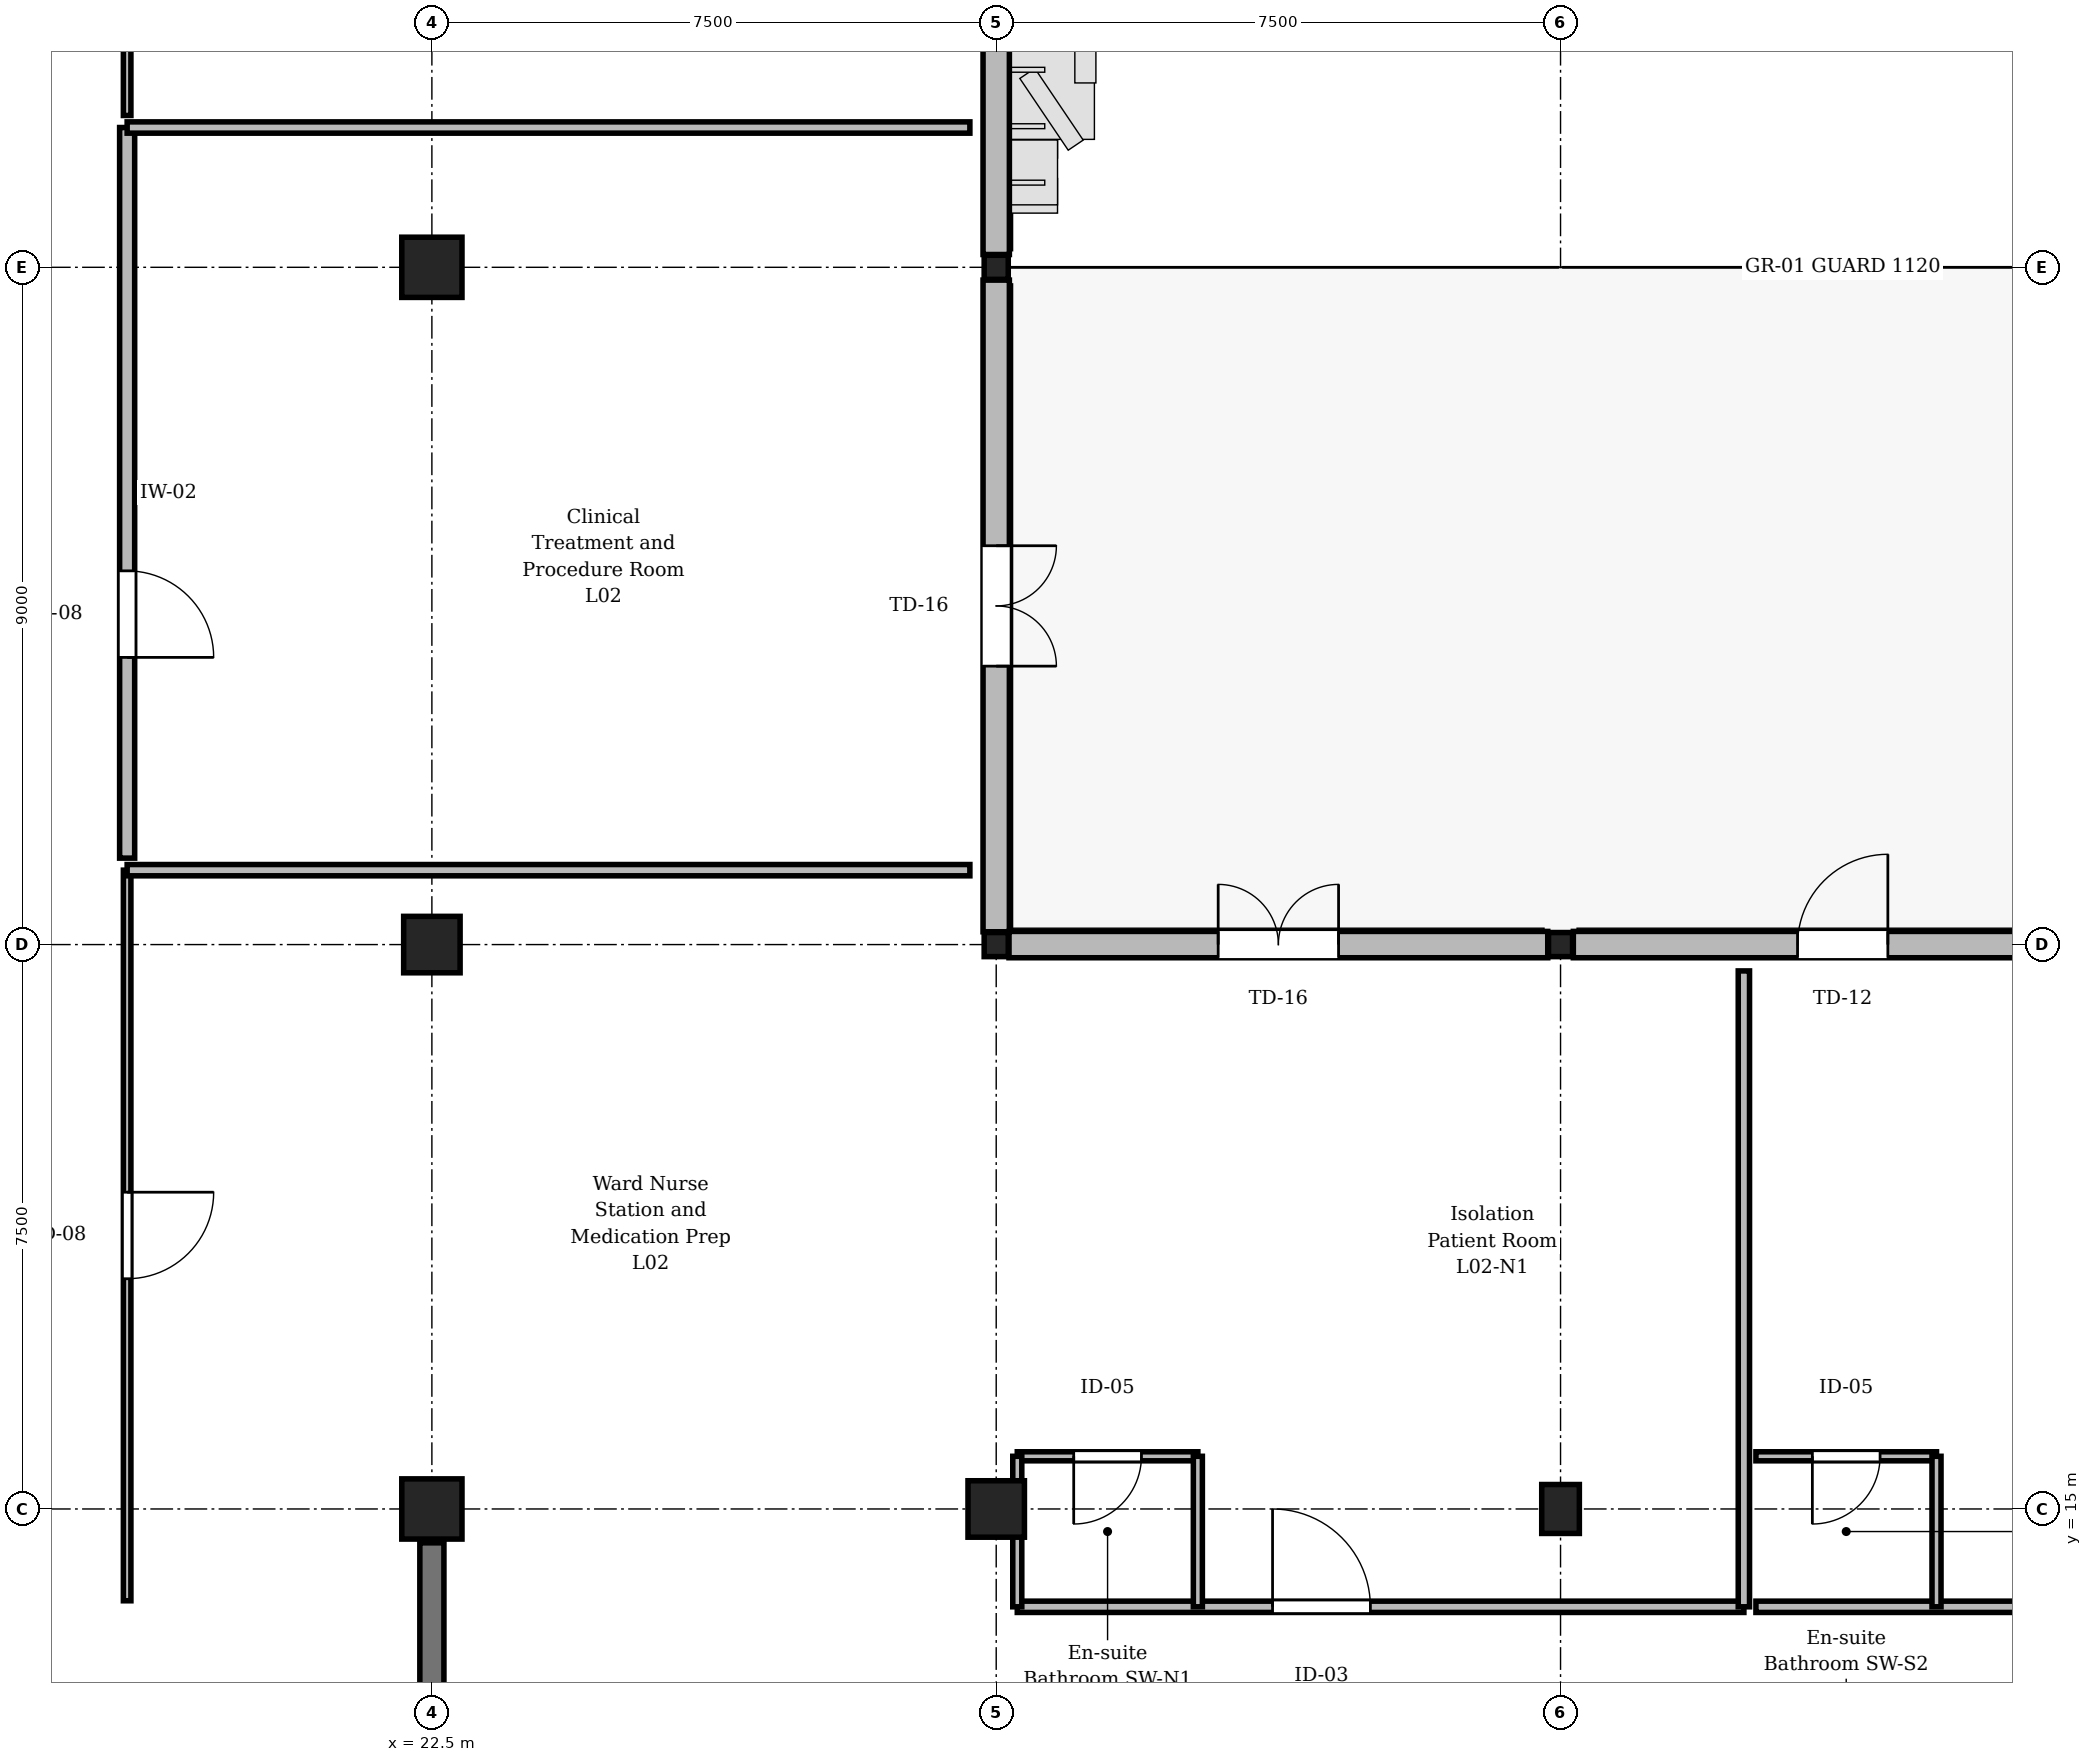
"""IFC4 building model, lengths in metres.
Left out: names, types, materials, properties, quantities, classifications, styles, units other than length and angle.
Written with IfcOpenShell. Run it as: python <this file> out.ifc"""

import sys

from ifc_helpers import new_model, si_unit, direction, frame, frame_2d, origin, origin_2d, place, context, subcontext, project, spatial, rectangle, circle, extrude, element, fill, save


model = new_model("IFC4")
c1 = context("Model", 3, precision=1e-05, world=origin(), true_north=direction((0.0, 1.0)))
c2 = subcontext(c1, "Body", "Model", "MODEL_VIEW")
j1 = project(units=[si_unit("LENGTHUNIT", "METRE"), si_unit("PLANEANGLEUNIT", "RADIAN")], contexts=[c1])
p1 = place(None, origin())
s1 = spatial("IfcSite", under=j1, at=p1, CompositionType="ELEMENT")
p2 = place(p1, origin())
s2 = spatial("IfcBuilding", under=s1, at=p2, CompositionType="ELEMENT")
p3 = place(p2, frame((0.0, 0.0, 9.3)))
s3 = spatial("IfcBuildingStorey", under=s2, at=p3, CompositionType="ELEMENT", Elevation=9.3)
p4 = place(p3, frame((22.5, 15.0, 0.0), z_axis=(0.0, 0.0, 1.0), x_axis=(1.0, 0.0, 0.0)))
e1 = element("IfcColumn", 1, at=p4, inside=s3, PredefinedType="COLUMN", context=c2, shape_type="SweptSolid", body=[
    extrude(rectangle(XDim=0.8, YDim=0.8, at=origin_2d()), origin(), (0.0, 0.0, 1.0), 4.8),
])
p5 = place(p3, frame((22.5, 22.5, 0.0), z_axis=(0.0, 0.0, 1.0), x_axis=(1.0, 0.0, 0.0)))
e2 = element("IfcColumn", 2, at=p5, inside=s3, PredefinedType="COLUMN", context=c2, shape_type="SweptSolid", body=[
    extrude(circle(Radius=0.375, at=origin_2d()), origin(), (0.0, 0.0, 1.0), 4.8),
])
p6 = place(p3, frame((22.5, 31.5, 0.0), z_axis=(0.0, 0.0, 1.0), x_axis=(1.0, 0.0, 0.0)))
e3 = element("IfcColumn", 3, at=p6, inside=s3, PredefinedType="COLUMN", context=c2, shape_type="SweptSolid", body=[
    extrude(rectangle(XDim=0.8, YDim=0.8, at=origin_2d()), origin(), (0.0, 0.0, 1.0), 4.8),
])
p7 = place(p3, frame((30.0, 15.0, 0.0), z_axis=(0.0, 0.0, 1.0), x_axis=(1.0, 0.0, 0.0)))
e4 = element("IfcColumn", 4, at=p7, inside=s3, PredefinedType="COLUMN", context=c2, shape_type="SweptSolid", body=[
    extrude(circle(Radius=0.375, at=origin_2d()), origin(), (0.0, 0.0, 1.0), 4.8),
])
for number, where, z_axis, x_axis in (
    (5, (30.0, 22.5, 0.0), (0.0, 0.0, 1.0), (1.0, 0.0, 0.0)),
    (6, (30.0, 31.5, 0.0), (0.0, 0.0, 1.0), (1.0, 0.0, 0.0)),
):
    element("IfcColumn", number, at=place(p3, frame(where, z_axis=z_axis, x_axis=x_axis)), inside=s3, PredefinedType="COLUMN", context=c2, shape_type="SweptSolid", body=[
        extrude(rectangle(XDim=0.32, YDim=0.32, at=origin_2d()), origin(), (0.0, 0.0, 1.0), 4.8),
    ])
p8 = place(p3, frame((37.5, 15.0, 0.0), z_axis=(0.0, 0.0, 1.0), x_axis=(1.0, 0.0, 0.0)))
e7 = element("IfcColumn", 7, at=p8, inside=s3, PredefinedType="COLUMN", context=c2, shape_type="SweptSolid", body=[
    extrude(rectangle(XDim=0.5, YDim=0.65, at=origin_2d()), origin(), (0.0, 0.0, 1.0), 4.8),
])
p9 = place(p3, frame((37.5, 22.5, 0.0), z_axis=(0.0, 0.0, 1.0), x_axis=(1.0, 0.0, 0.0)))
e8 = element("IfcColumn", 8, at=p9, inside=s3, PredefinedType="COLUMN", context=c2, shape_type="SweptSolid", body=[
    extrude(rectangle(XDim=0.32, YDim=0.32, at=origin_2d()), origin(), (0.0, 0.0, 1.0), 4.8),
])
p10 = place(p3, frame((22.5, 7.95, 0.0), z_axis=(0.0, 0.0, 1.0), x_axis=(0.0, 1.0, 0.0)))
e9 = element("IfcWall", 9, at=p10, inside=s3, PredefinedType="SHEAR", context=c2, shape_type="SweptSolid", body=[
    extrude(rectangle(XDim=6.6, YDim=0.32, at=frame_2d((3.3, 0.0))), origin(), (0.0, 0.0, 1.0), 4.0),
])
p11 = place(p3, frame((30.0, 31.33, 0.0), z_axis=(0.0, 0.0, 1.0), x_axis=(0.0, -1.0, 0.0)))
e10 = element("IfcWall", 10, at=p11, inside=s3, PredefinedType="STANDARD", context=c2, shape_type="SweptSolid", body=[
    extrude(rectangle(XDim=8.66, YDim=0.35, at=frame_2d((4.33, 0.0))), origin(), (0.0, 0.0, 1.0), 4.0),
])
p12 = place(p11, frame((3.53, 0.0, 0.0)))
e11 = element("IfcOpeningElement", 11, at=p12, cuts=e10, PredefinedType="OPENING", context=c2, shape_type="SweptSolid", body=[
    extrude(rectangle(XDim=1.6, YDim=2.35, at=frame_2d((0.8, 1.175))), frame((0.0, 0.185, 0.0), z_axis=(0.0, -1.0, 0.0), x_axis=(1.0, 0.0, 0.0)), (0.0, 0.0, 1.0), 0.37),
])
p13 = place(p3, frame((30.0, 38.83, 0.0), z_axis=(0.0, 0.0, 1.0), x_axis=(0.0, -1.0, 0.0)))
e12 = element("IfcWall", 12, at=p13, inside=s3, PredefinedType="STANDARD", context=c2, shape_type="SweptSolid", body=[
    extrude(rectangle(XDim=7.16, YDim=0.35, at=frame_2d((3.58, 0.0))), origin(), (0.0, 0.0, 1.0), 3.95),
])
p14 = place(p13, frame((2.78, 0.0, 0.9)))
e13 = element("IfcOpeningElement", 13, at=p14, cuts=e12, PredefinedType="OPENING", context=c2, shape_type="SweptSolid", body=[
    extrude(rectangle(XDim=1.6, YDim=1.8, at=frame_2d((0.8, 0.9))), frame((0.0, 0.185, 0.0), z_axis=(0.0, -1.0, 0.0), x_axis=(1.0, 0.0, 0.0)), (0.0, 0.0, 1.0), 0.37),
])
p15 = place(p3, frame((30.17, 22.5, 0.0), z_axis=(0.0, 0.0, 1.0), x_axis=(1.0, 0.0, 0.0)))
e14 = element("IfcWall", 14, at=p15, inside=s3, PredefinedType="STANDARD", context=c2, shape_type="SweptSolid", body=[
    extrude(rectangle(XDim=7.16, YDim=0.35, at=frame_2d((3.58, 0.0))), origin(), (0.0, 0.0, 1.0), 3.95),
])
p16 = place(p15, frame((2.78, 0.0, 0.0)))
e15 = element("IfcOpeningElement", 15, at=p16, cuts=e14, PredefinedType="OPENING", context=c2, shape_type="SweptSolid", body=[
    extrude(rectangle(XDim=1.6, YDim=2.35, at=frame_2d((0.8, 1.175))), frame((0.0, 0.185, 0.0), z_axis=(0.0, -1.0, 0.0), x_axis=(1.0, 0.0, 0.0)), (0.0, 0.0, 1.0), 0.37),
])
p17 = place(p3, frame((37.67, 22.5, 0.0), z_axis=(0.0, 0.0, 1.0), x_axis=(1.0, 0.0, 0.0)))
e16 = element("IfcWall", 16, at=p17, inside=s3, PredefinedType="STANDARD", context=c2, shape_type="SweptSolid", body=[
    extrude(rectangle(XDim=7.16, YDim=0.35, at=frame_2d((3.58, 0.0))), origin(), (0.0, 0.0, 1.0), 3.95),
])
p18 = place(p17, frame((2.98, 0.0, 0.0)))
e17 = element("IfcOpeningElement", 17, at=p18, cuts=e16, PredefinedType="OPENING", context=c2, shape_type="SweptSolid", body=[
    extrude(rectangle(XDim=1.2, YDim=2.3, at=frame_2d((0.6, 1.15))), frame((0.0, 0.185, 0.0), z_axis=(0.0, -1.0, 0.0), x_axis=(1.0, 0.0, 0.0)), (0.0, 0.0, 1.0), 0.37),
])
p19 = place(p3, frame((18.45, 23.489, 0.0), z_axis=(0.0, 0.0, 1.0), x_axis=(0.0, -1.0, 0.0)))
e18 = element("IfcWall", 18, at=p19, inside=s3, PredefinedType="PARTITIONING", context=c2, shape_type="SweptSolid", body=[
    extrude(rectangle(XDim=9.709, YDim=0.1, at=frame_2d((4.854, 0.0))), origin(), (0.0, 0.0, 1.0), 4.135),
])
p20 = place(p19, frame((4.279, 0.0, 0.0)))
e19 = element("IfcOpeningElement", 19, at=p20, cuts=e18, PredefinedType="OPENING", context=c2, shape_type="SweptSolid", body=[
    extrude(rectangle(XDim=1.15, YDim=2.2, at=frame_2d((0.575, 1.1))), frame((0.0, 0.06, 0.0), z_axis=(0.0, -1.0, 0.0), x_axis=(1.0, 0.0, 0.0)), (0.0, 0.0, 1.0), 0.12),
])
p21 = place(p3, frame((18.45, 33.357, 0.0), z_axis=(0.0, 0.0, 1.0), x_axis=(0.0, -1.0, 0.0)))
e20 = element("IfcWall", 20, at=p21, inside=s3, PredefinedType="STANDARD", context=c2, shape_type="SweptSolid", body=[
    extrude(rectangle(XDim=9.709, YDim=0.2, at=frame_2d((4.854, 0.0))), origin(), (0.0, 0.0, 1.0), 4.135),
])
p22 = place(p21, frame((5.891, 0.0, 0.0)))
e21 = element("IfcOpeningElement", 21, at=p22, cuts=e20, PredefinedType="OPENING", context=c2, shape_type="SweptSolid", body=[
    extrude(rectangle(XDim=1.15, YDim=2.2, at=frame_2d((0.575, 1.1))), frame((0.0, 0.11, 0.0), z_axis=(0.0, -1.0, 0.0), x_axis=(1.0, 0.0, 0.0)), (0.0, 0.0, 1.0), 0.22),
])
p23 = place(p3, frame((18.45, 43.226, 0.0), z_axis=(0.0, 0.0, 1.0), x_axis=(0.0, -1.0, 0.0)))
e22 = element("IfcWall", 22, at=p23, inside=s3, PredefinedType="PARTITIONING", context=c2, shape_type="SweptSolid", body=[
    extrude(rectangle(XDim=9.709, YDim=0.1, at=frame_2d((4.854, 0.0))), origin(), (0.0, 0.0, 1.0), 4.535),
])
p24 = place(p23, frame((7.593, 0.0, 0.0)))
e23 = element("IfcOpeningElement", 23, at=p24, cuts=e22, PredefinedType="OPENING", context=c2, shape_type="SweptSolid", body=[
    extrude(rectangle(XDim=1.05, YDim=2.2, at=frame_2d((0.525, 1.1))), frame((0.0, 0.06, 0.0), z_axis=(0.0, -1.0, 0.0), x_axis=(1.0, 0.0, 0.0)), (0.0, 0.0, 1.0), 0.12),
])
p25 = place(p3, frame((30.28, 13.7, 0.0), z_axis=(0.0, 0.0, 1.0), x_axis=(1.0, 0.0, 0.0)))
e24 = element("IfcWall", 24, at=p25, inside=s3, PredefinedType="PARTITIONING", context=c2, shape_type="SweptSolid", body=[
    extrude(rectangle(XDim=9.657, YDim=0.15, at=frame_2d((4.828, 0.0))), origin(), (0.0, 0.0, 1.0), 4.535),
])
p26 = place(p25, frame((3.393, 0.0, 0.0)))
e25 = element("IfcOpeningElement", 25, at=p26, cuts=e24, PredefinedType="OPENING", context=c2, shape_type="SweptSolid", body=[
    extrude(rectangle(XDim=1.3, YDim=2.2, at=frame_2d((0.65, 1.1))), frame((0.0, 0.085, 0.0), z_axis=(0.0, -1.0, 0.0), x_axis=(1.0, 0.0, 0.0)), (0.0, 0.0, 1.0), 0.17),
])
p27 = place(p3, frame((32.68, 15.7, 0.0), z_axis=(0.0, 0.0, 1.0), x_axis=(-1.0, 0.0, 0.0)))
e26 = element("IfcWall", 26, at=p27, inside=s3, PredefinedType="PARTITIONING", context=c2, shape_type="SweptSolid", body=[
    extrude(rectangle(XDim=2.4, YDim=0.12, at=frame_2d((1.2, 0.0))), origin(), (0.0, 0.0, 1.0), 4.535),
])
p28 = place(p27, frame((0.75, 0.0, 0.0)))
e27 = element("IfcOpeningElement", 27, at=p28, cuts=e26, PredefinedType="OPENING", context=c2, shape_type="SweptSolid", body=[
    extrude(rectangle(XDim=0.9, YDim=2.1, at=frame_2d((0.45, 1.05))), frame((0.0, 0.07, 0.0), z_axis=(0.0, -1.0, 0.0), x_axis=(1.0, 0.0, 0.0)), (0.0, 0.0, 1.0), 0.14),
])
p29 = place(p3, frame((32.68, 13.7, 0.0), z_axis=(0.0, 0.0, 1.0), x_axis=(0.0, 1.0, 0.0)))
e28 = element("IfcWall", 28, at=p29, inside=s3, PredefinedType="PARTITIONING", context=c2, shape_type="SweptSolid", body=[
    extrude(rectangle(XDim=2.0, YDim=0.12, at=frame_2d((1.0, 0.0))), origin(), (0.0, 0.0, 1.0), 4.535),
])
p30 = place(p3, frame((40.097, 13.7, 0.0), z_axis=(0.0, 0.0, 1.0), x_axis=(1.0, 0.0, 0.0)))
e29 = element("IfcWall", 29, at=p30, inside=s3, PredefinedType="PARTITIONING", context=c2, shape_type="SweptSolid", body=[
    extrude(rectangle(XDim=9.657, YDim=0.15, at=frame_2d((4.828, 0.0))), origin(), (0.0, 0.0, 1.0), 4.535),
])
p31 = place(p30, frame((8.107, 0.0, 0.0)))
e30 = element("IfcOpeningElement", 30, at=p31, cuts=e29, PredefinedType="OPENING", context=c2, shape_type="SweptSolid", body=[
    extrude(rectangle(XDim=1.3, YDim=2.2, at=frame_2d((0.65, 1.1))), frame((0.0, 0.085, 0.0), z_axis=(0.0, -1.0, 0.0), x_axis=(1.0, 0.0, 0.0)), (0.0, 0.0, 1.0), 0.17),
])
p32 = place(p3, frame((42.497, 15.7, 0.0), z_axis=(0.0, 0.0, 1.0), x_axis=(-1.0, 0.0, 0.0)))
e31 = element("IfcWall", 31, at=p32, inside=s3, PredefinedType="PARTITIONING", context=c2, shape_type="SweptSolid", body=[
    extrude(rectangle(XDim=2.4, YDim=0.12, at=frame_2d((1.2, 0.0))), origin(), (0.0, 0.0, 1.0), 4.535),
])
p33 = place(p32, frame((0.75, 0.0, 0.0)))
e32 = element("IfcOpeningElement", 32, at=p33, cuts=e31, PredefinedType="OPENING", context=c2, shape_type="SweptSolid", body=[
    extrude(rectangle(XDim=0.9, YDim=2.1, at=frame_2d((0.45, 1.05))), frame((0.0, 0.07, 0.0), z_axis=(0.0, -1.0, 0.0), x_axis=(1.0, 0.0, 0.0)), (0.0, 0.0, 1.0), 0.14),
])
p34 = place(p3, frame((42.497, 13.7, 0.0), z_axis=(0.0, 0.0, 1.0), x_axis=(0.0, 1.0, 0.0)))
e33 = element("IfcWall", 33, at=p34, inside=s3, PredefinedType="PARTITIONING", context=c2, shape_type="SweptSolid", body=[
    extrude(rectangle(XDim=2.0, YDim=0.12, at=frame_2d((1.0, 0.0))), origin(), (0.0, 0.0, 1.0), 4.535),
])
for number, where, z_axis, x_axis in (
    (34, (18.45, 23.489, 0.0), (0.0, 0.0, 1.0), (1.0, 0.0, 0.0)),
    (35, (18.45, 33.357, 0.0), (0.0, 0.0, 1.0), (1.0, 0.0, 0.0)),
):
    element("IfcWall", number, at=place(p3, frame(where, z_axis=z_axis, x_axis=x_axis)), inside=s3, PredefinedType="PARTITIONING", context=c2, shape_type="SweptSolid", body=[
        extrude(rectangle(XDim=11.2, YDim=0.15, at=frame_2d((5.6, 0.0))), origin(), (0.0, 0.0, 1.0), 4.535),
    ])
p35 = place(p3, frame((39.937, 13.7, 0.0), z_axis=(0.0, 0.0, 1.0), x_axis=(0.0, 1.0, 0.0)))
e36 = element("IfcWall", 36, at=p35, inside=s3, PredefinedType="PARTITIONING", context=c2, shape_type="SweptSolid", body=[
    extrude(rectangle(XDim=8.45, YDim=0.15, at=frame_2d((4.225, 0.0))), origin(), (0.0, 0.0, 1.0), 4.535),
])
p36 = place(p3, frame((30.28, 13.7, 0.0), z_axis=(0.0, 0.0, 1.0), x_axis=(0.0, 1.0, 0.0)))
e37 = element("IfcWall", 37, at=p36, inside=s3, PredefinedType="PARTITIONING", context=c2, shape_type="SweptSolid", body=[
    extrude(rectangle(XDim=2.0, YDim=0.12, at=frame_2d((1.0, 0.0))), origin(), (0.0, 0.0, 1.0), 3.985),
])
p37 = place(p12, origin())
e38 = element("IfcDoor", 38, at=p37, inside=s3, OperationType="DOUBLE_DOOR_SINGLE_SWING", PredefinedType="DOOR", context=c2, shape_type="SweptSolid", body=[
    extrude(rectangle(XDim=1.6, YDim=2.35, at=frame_2d((0.8, 1.175))), frame((0.0, 0.025, 0.0), z_axis=(0.0, -1.0, 0.0), x_axis=(1.0, 0.0, 0.0)), (0.0, 0.0, 1.0), 0.05),
])
fill(e11, e38)
p38 = place(p16, origin())
e39 = element("IfcDoor", 39, at=p38, inside=s3, OperationType="DOUBLE_DOOR_SINGLE_SWING", PredefinedType="DOOR", context=c2, shape_type="SweptSolid", body=[
    extrude(rectangle(XDim=1.6, YDim=2.35, at=frame_2d((0.8, 1.175))), frame((0.0, 0.025, 0.0), z_axis=(0.0, -1.0, 0.0), x_axis=(1.0, 0.0, 0.0)), (0.0, 0.0, 1.0), 0.05),
])
fill(e15, e39)
p39 = place(p18, origin())
e40 = element("IfcDoor", 40, at=p39, inside=s3, OperationType="SINGLE_SWING_RIGHT", PredefinedType="DOOR", context=c2, shape_type="SweptSolid", body=[
    extrude(rectangle(XDim=1.2, YDim=2.3, at=frame_2d((0.6, 1.15))), frame((0.0, 0.025, 0.0), z_axis=(0.0, -1.0, 0.0), x_axis=(1.0, 0.0, 0.0)), (0.0, 0.0, 1.0), 0.05),
])
fill(e17, e40)
p40 = place(p20, origin())
e41 = element("IfcDoor", 41, at=p40, inside=s3, OperationType="SINGLE_SWING_LEFT", PredefinedType="DOOR", context=c2, shape_type="SweptSolid", body=[
    extrude(rectangle(XDim=1.15, YDim=2.2, at=frame_2d((0.575, 1.1))), frame((0.0, 0.025, 0.0), z_axis=(0.0, -1.0, 0.0), x_axis=(1.0, 0.0, 0.0)), (0.0, 0.0, 1.0), 0.05),
])
fill(e19, e41)
p41 = place(p22, origin())
e42 = element("IfcDoor", 42, at=p41, inside=s3, OperationType="SINGLE_SWING_RIGHT", PredefinedType="DOOR", context=c2, shape_type="SweptSolid", body=[
    extrude(rectangle(XDim=1.15, YDim=2.2, at=frame_2d((0.575, 1.1))), frame((0.0, 0.025, 0.0), z_axis=(0.0, -1.0, 0.0), x_axis=(1.0, 0.0, 0.0)), (0.0, 0.0, 1.0), 0.05),
])
fill(e21, e42)
p42 = place(p26, origin())
e43 = element("IfcDoor", 43, at=p42, inside=s3, OperationType="SINGLE_SWING_LEFT", PredefinedType="DOOR", context=c2, shape_type="SweptSolid", body=[
    extrude(rectangle(XDim=1.3, YDim=2.2, at=frame_2d((0.65, 1.1))), frame((0.0, 0.025, 0.0), z_axis=(0.0, -1.0, 0.0), x_axis=(1.0, 0.0, 0.0)), (0.0, 0.0, 1.0), 0.05),
])
fill(e25, e43)
p43 = place(p28, origin())
e44 = element("IfcDoor", 44, at=p43, inside=s3, OperationType="SINGLE_SWING_RIGHT", PredefinedType="DOOR", context=c2, shape_type="SweptSolid", body=[
    extrude(rectangle(XDim=0.9, YDim=2.1, at=frame_2d((0.45, 1.05))), frame((0.0, 0.025, 0.0), z_axis=(0.0, -1.0, 0.0), x_axis=(1.0, 0.0, 0.0)), (0.0, 0.0, 1.0), 0.05),
])
fill(e27, e44)
p44 = place(p33, origin())
e45 = element("IfcDoor", 45, at=p44, inside=s3, OperationType="SINGLE_SWING_RIGHT", PredefinedType="DOOR", context=c2, shape_type="SweptSolid", body=[
    extrude(rectangle(XDim=0.9, YDim=2.1, at=frame_2d((0.45, 1.05))), frame((0.0, 0.025, 0.0), z_axis=(0.0, -1.0, 0.0), x_axis=(1.0, 0.0, 0.0)), (0.0, 0.0, 1.0), 0.05),
])
fill(e32, e45)
save(model, sys.argv[1])
